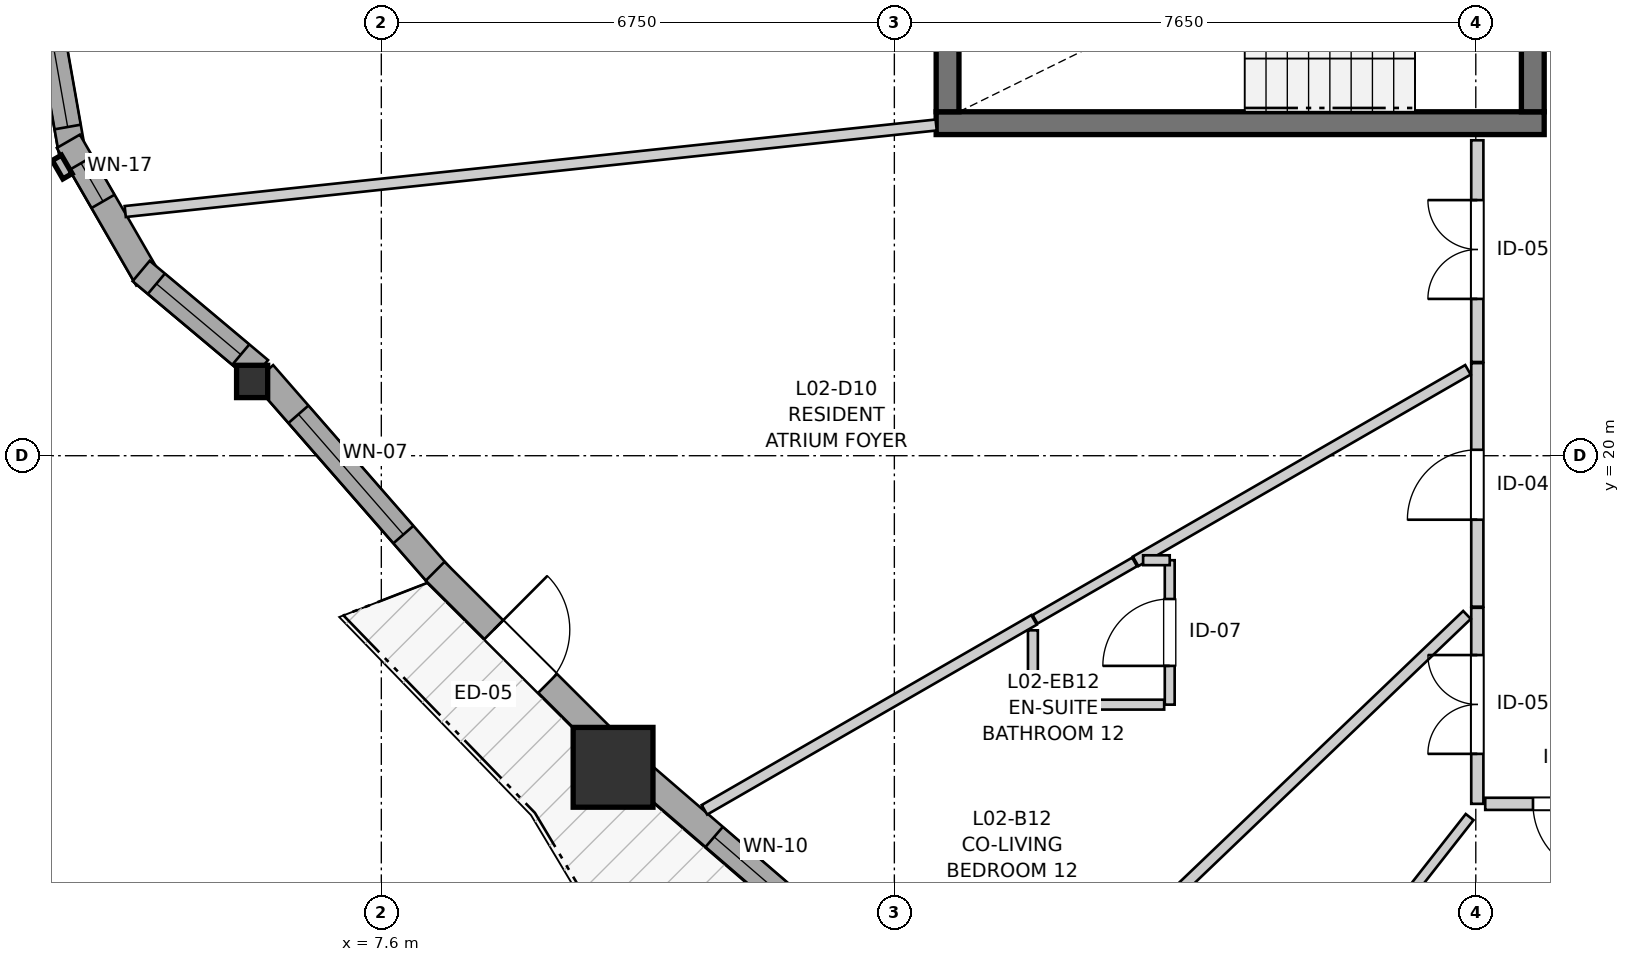
"""IFC4 building model, lengths in metres.
Left out: names, types, materials, properties, quantities, classifications, styles, units other than length and angle.
Written with IfcOpenShell. Run it as: python <this file> out.ifc"""

import sys

from ifc_helpers import new_model, si_unit, direction, frame, frame_2d, origin, origin_2d, place, context, subcontext, project, spatial, rectangle, i_section, extrude, source, transform, mapped, element, fill, save


model = new_model("IFC4")
c1 = context("Model", 3, precision=1e-05, world=origin(), true_north=direction((0.0, 1.0)))
c2 = subcontext(c1, "Body", "Model", "MODEL_VIEW")
j1 = project(units=[si_unit("LENGTHUNIT", "METRE"), si_unit("PLANEANGLEUNIT", "RADIAN")], contexts=[c1])
p1 = place(None, origin())
s1 = spatial("IfcSite", under=j1, at=p1, CompositionType="ELEMENT")
p2 = place(p1, origin())
s2 = spatial("IfcBuilding", under=s1, at=p2, CompositionType="ELEMENT")
p3 = place(p2, frame((0.0, 0.0, 11.0)))
s3 = spatial("IfcBuildingStorey", under=s2, at=p3, CompositionType="ELEMENT", Elevation=11.0)
p4 = place(p3, frame((14.9, 24.375, 0.0), z_axis=(0.0, 0.0, 1.0), x_axis=(1.0, 0.0, 0.0)))
e1 = element("IfcWall", 1, at=p4, inside=s3, PredefinedType="SHEAR", context=c2, shape_type="SweptSolid", body=[
    extrude(rectangle(XDim=8.0, YDim=0.3, at=frame_2d((4.0, 0.0))), origin(), (0.0, 0.0, 1.0), 2.94),
])
p5 = place(p3, frame((15.05, 27.475, 0.0), z_axis=(0.0, 0.0, 1.0), x_axis=(0.0, -1.0, 0.0)))
e2 = element("IfcWall", 2, at=p5, inside=s3, PredefinedType="SHEAR", context=c2, shape_type="SweptSolid", body=[
    extrude(rectangle(XDim=2.95, YDim=0.3, at=frame_2d((1.475, 0.0))), origin(), (0.0, 0.0, 1.0), 2.94),
])
p6 = place(p3, frame((22.75, 24.525, 0.0), z_axis=(0.0, 0.0, 1.0), x_axis=(0.0, 1.0, 0.0)))
e3 = element("IfcWall", 3, at=p6, inside=s3, PredefinedType="SHEAR", context=c2, shape_type="SweptSolid", body=[
    extrude(rectangle(XDim=2.95, YDim=0.3, at=frame_2d((1.475, 0.0))), origin(), (0.0, 0.0, 1.0), 2.94),
])
p7 = place(p6, frame((0.985, 0.0, 0.0)))
e4 = element("IfcOpeningElement", 4, at=p7, cuts=e3, PredefinedType="OPENING", context=c2, shape_type="SweptSolid", body=[
    extrude(rectangle(XDim=0.98, YDim=2.15, at=frame_2d((0.49, 1.075))), frame((0.0, 0.16, 0.0), z_axis=(0.0, -1.0, 0.0), x_axis=(1.0, 0.0, 0.0)), (0.0, 0.0, 1.0), 0.32),
])
m1 = source(origin(), c2, "Body", "SweptSolid", [
    extrude(i_section(OverallWidth=0.409, OverallDepth=0.425, WebThickness=0.03, FlangeThickness=0.048, FilletRadius=0.015, at=origin_2d()), origin(), (0.0, 0.0, 1.0), 2.94),
])
p8 = place(p3, frame((5.9, 20.977, 0.0), z_axis=(0.0, 0.0, 1.0), x_axis=(1.0, 0.0, 0.0)))
e5 = element("IfcColumn", 5, at=p8, inside=s3, PredefinedType="PILASTER", context=c2, shape_type="MappedRepresentation", body=[
    mapped(m1, transform((0.0, 0.0, 0.0), x_axis=(1.0, 0.0, 0.0), y_axis=(0.0, 1.0, 0.0), z_axis=(0.0, 0.0, 1.0), scale=1.0)),
])
m2 = source(origin(), c2, "Body", "SweptSolid", [
    extrude(rectangle(XDim=1.05, YDim=1.05, at=origin_2d()), origin(), (0.0, 0.0, 1.0), 2.94),
])
p9 = place(p3, frame((10.649, 15.9, 0.0), z_axis=(0.0, 0.0, 1.0), x_axis=(1.0, 0.0, 0.0)))
e6 = element("IfcColumn", 6, at=p9, inside=s3, PredefinedType="COLUMN", context=c2, shape_type="MappedRepresentation", body=[
    mapped(m2, transform((0.0, 0.0, 0.0), x_axis=(1.0, 0.0, 0.0), y_axis=(0.0, 1.0, 0.0), z_axis=(0.0, 0.0, 1.0), scale=1.0)),
])
p10 = place(p3, frame((3.166, 26.068, 0.0), z_axis=(0.0, 0.0, 1.0), x_axis=(0.173672066494, -0.984803540469, 0.0)))
e7 = element("IfcWall", 7, at=p10, inside=s3, PredefinedType="SOLIDWALL", context=c2, shape_type="SweptSolid", body=[
    extrude(rectangle(XDim=2.09, YDim=0.35, at=frame_2d((1.045, 0.0))), origin(), (0.0, 0.0, 1.0), 2.42),
])
p11 = place(p10, frame((0.32, 0.0, 0.82)))
e8 = element("IfcOpeningElement", 8, at=p11, cuts=e7, PredefinedType="OPENING", context=c2, shape_type="SweptSolid", body=[
    extrude(rectangle(XDim=1.45, YDim=1.25, at=frame_2d((0.725, 0.625))), frame((0.0, 0.185, 0.0), z_axis=(0.0, -1.0, 0.0), x_axis=(1.0, 0.0, 0.0)), (0.0, 0.0, 1.0), 0.37),
])
p12 = place(p3, frame((3.482, 24.137, 0.0), z_axis=(0.0, 0.0, 1.0), x_axis=(0.499995423472, -0.866028046028, 0.0)))
e9 = element("IfcWall", 9, at=p12, inside=s3, PredefinedType="SOLIDWALL", context=c2, shape_type="SweptSolid", body=[
    extrude(rectangle(XDim=2.09, YDim=0.35, at=frame_2d((1.045, 0.0))), origin(), (0.0, 0.0, 1.0), 2.42),
])
p13 = place(p12, frame((0.333, 0.0, 0.82)))
e10 = element("IfcOpeningElement", 10, at=p13, cuts=e9, PredefinedType="OPENING", context=c2, shape_type="SweptSolid", body=[
    extrude(rectangle(XDim=0.58, YDim=1.35, at=frame_2d((0.29, 0.675))), frame((0.0, 0.185, 0.0), z_axis=(0.0, -1.0, 0.0), x_axis=(1.0, 0.0, 0.0)), (0.0, 0.0, 1.0), 0.37),
])
p14 = place(p3, frame((4.44, 22.43, 0.0), z_axis=(0.0, 0.0, 1.0), x_axis=(0.766090423188, -0.642732808793, 0.0)))
e11 = element("IfcWall", 11, at=p14, inside=s3, PredefinedType="SOLIDWALL", context=c2, shape_type="SweptSolid", body=[
    extrude(rectangle(XDim=2.032, YDim=0.35, at=frame_2d((1.016, 0.0))), origin(), (0.0, 0.0, 1.0), 2.42),
])
p15 = place(p14, frame((0.261, 0.0, 0.82)))
e12 = element("IfcOpeningElement", 12, at=p15, cuts=e11, PredefinedType="OPENING", context=c2, shape_type="SweptSolid", body=[
    extrude(rectangle(XDim=1.45, YDim=1.25, at=frame_2d((0.725, 0.625))), frame((0.0, 0.185, 0.0), z_axis=(0.0, -1.0, 0.0), x_axis=(1.0, 0.0, 0.0)), (0.0, 0.0, 1.0), 0.37),
])
p16 = place(p3, frame((6.045, 21.077, 0.0), z_axis=(0.0, 0.0, 1.0), x_axis=(0.657628390725, -0.753342485004, 0.0)))
e13 = element("IfcWall", 13, at=p16, inside=s3, PredefinedType="SOLIDWALL", context=c2, shape_type="SweptSolid", body=[
    extrude(rectangle(XDim=3.533, YDim=0.35, at=frame_2d((1.766, 0.0))), origin(), (0.0, 0.0, 1.0), 2.42),
])
p17 = place(p16, frame((0.706, 0.0, 0.82)))
e14 = element("IfcOpeningElement", 14, at=p17, cuts=e13, PredefinedType="OPENING", context=c2, shape_type="SweptSolid", body=[
    extrude(rectangle(XDim=2.1, YDim=1.4, at=frame_2d((1.05, 0.7))), frame((0.0, 0.185, 0.0), z_axis=(0.0, -1.0, 0.0), x_axis=(1.0, 0.0, 0.0)), (0.0, 0.0, 1.0), 0.37),
])
p18 = place(p3, frame((8.308, 18.48, 0.0), z_axis=(0.0, 0.0, 1.0), x_axis=(0.708411049028, -0.705800103156, 0.0)))
e15 = element("IfcWall", 15, at=p18, inside=s3, PredefinedType="SOLIDWALL", context=c2, shape_type="SweptSolid", body=[
    extrude(rectangle(XDim=3.179, YDim=0.35, at=frame_2d((1.59, 0.0))), origin(), (0.0, 0.0, 1.0), 2.42),
])
p19 = place(p18, frame((1.09, 0.0, 0.0)))
e16 = element("IfcOpeningElement", 16, at=p19, cuts=e15, PredefinedType="OPENING", context=c2, shape_type="SweptSolid", body=[
    extrude(rectangle(XDim=1.0, YDim=2.1, at=frame_2d((0.5, 1.05))), frame((0.0, 0.185, 0.0), z_axis=(0.0, -1.0, 0.0), x_axis=(1.0, 0.0, 0.0)), (0.0, 0.0, 1.0), 0.37),
])
p20 = place(p3, frame((10.99, 15.837, 0.0), z_axis=(0.0, 0.0, 1.0), x_axis=(0.757465946779, -0.652874673632, 0.0)))
e17 = element("IfcWall", 17, at=p20, inside=s3, PredefinedType="SOLIDWALL", context=c2, shape_type="SweptSolid", body=[
    extrude(rectangle(XDim=3.123, YDim=0.35, at=frame_2d((1.562, 0.0))), origin(), (0.0, 0.0, 1.0), 2.42),
])
p21 = place(p20, frame((1.305, 0.0, 0.82)))
e18 = element("IfcOpeningElement", 18, at=p21, cuts=e17, PredefinedType="OPENING", context=c2, shape_type="SweptSolid", body=[
    extrude(rectangle(XDim=1.4, YDim=1.35, at=frame_2d((0.7, 0.675))), frame((0.0, 0.185, 0.0), z_axis=(0.0, -1.0, 0.0), x_axis=(1.0, 0.0, 0.0)), (0.0, 0.0, 1.0), 0.37),
])
p22 = place(p3, frame((22.02, 18.014, 0.0), z_axis=(0.0, 0.0, 1.0), x_axis=(0.0, 1.0, 0.0)))
e19 = element("IfcWall", 19, at=p22, inside=s3, PredefinedType="PARTITIONING", context=c2, shape_type="SweptSolid", body=[
    extrude(rectangle(XDim=3.204, YDim=0.16, at=frame_2d((1.602, 0.0))), origin(), (0.0, 0.0, 1.0), 2.94),
])
p23 = place(p22, frame((1.144, 0.0, 0.0)))
e20 = element("IfcOpeningElement", 20, at=p23, cuts=e19, PredefinedType="OPENING", context=c2, shape_type="SweptSolid", body=[
    extrude(rectangle(XDim=0.92, YDim=2.1, at=frame_2d((0.46, 1.05))), frame((0.0, 0.09, 0.0), z_axis=(0.0, -1.0, 0.0), x_axis=(1.0, 0.0, 0.0)), (0.0, 0.0, 1.0), 0.18),
])
p24 = place(p3, frame((22.02, 21.233, 0.0), z_axis=(0.0, 0.0, 1.0), x_axis=(0.0, 1.0, 0.0)))
e21 = element("IfcWall", 21, at=p24, inside=s3, PredefinedType="PARTITIONING", context=c2, shape_type="SweptSolid", body=[
    extrude(rectangle(XDim=2.917, YDim=0.16, at=frame_2d((1.458, 0.0))), origin(), (0.0, 0.0, 1.0), 2.94),
])
p25 = place(p24, frame((0.83, 0.0, 0.0)))
e22 = element("IfcOpeningElement", 22, at=p25, cuts=e21, PredefinedType="OPENING", context=c2, shape_type="SweptSolid", body=[
    extrude(rectangle(XDim=1.3, YDim=2.1, at=frame_2d((0.65, 1.05))), frame((0.0, 0.09, 0.0), z_axis=(0.0, -1.0, 0.0), x_axis=(1.0, 0.0, 0.0)), (0.0, 0.0, 1.0), 0.18),
])
p26 = place(p3, frame((22.02, 15.42, 0.0), z_axis=(0.0, 0.0, 1.0), x_axis=(0.0, 1.0, 0.0)))
e23 = element("IfcWall", 23, at=p26, inside=s3, PredefinedType="PARTITIONING", context=c2, shape_type="SweptSolid", body=[
    extrude(rectangle(XDim=2.579, YDim=0.16, at=frame_2d((1.29, 0.0))), origin(), (0.0, 0.0, 1.0), 2.94),
])
p27 = place(p26, frame((0.657, 0.0, 0.0)))
e24 = element("IfcOpeningElement", 24, at=p27, cuts=e23, PredefinedType="OPENING", context=c2, shape_type="SweptSolid", body=[
    extrude(rectangle(XDim=1.3, YDim=2.1, at=frame_2d((0.65, 1.05))), frame((0.0, 0.09, 0.0), z_axis=(0.0, -1.0, 0.0), x_axis=(1.0, 0.0, 0.0)), (0.0, 0.0, 1.0), 0.18),
])
p28 = place(p3, frame((24.368, 15.42, 0.0), z_axis=(0.0, 0.0, 1.0), x_axis=(-1.0, 0.0, 0.0)))
e25 = element("IfcWall", 25, at=p28, inside=s3, PredefinedType="PARTITIONING", context=c2, shape_type="SweptSolid", body=[
    extrude(rectangle(XDim=2.244, YDim=0.16, at=frame_2d((1.122, 0.0))), origin(), (0.0, 0.0, 1.0), 2.94),
])
p29 = place(p28, frame((0.666, 0.0, 0.0)))
e26 = element("IfcOpeningElement", 26, at=p29, cuts=e25, PredefinedType="OPENING", context=c2, shape_type="SweptSolid", body=[
    extrude(rectangle(XDim=0.95, YDim=2.1, at=frame_2d((0.475, 1.05))), frame((0.0, 0.09, 0.0), z_axis=(0.0, -1.0, 0.0), x_axis=(1.0, 0.0, 0.0)), (0.0, 0.0, 1.0), 0.18),
])
p30 = place(p3, frame((17.973, 16.725, 0.0), z_axis=(0.0, 0.0, 1.0), x_axis=(0.0, 1.0, 0.0)))
e27 = element("IfcWall", 27, at=p30, inside=s3, PredefinedType="PARTITIONING", context=c2, shape_type="SweptSolid", body=[
    extrude(rectangle(XDim=1.9, YDim=0.13, at=frame_2d((0.95, 0.0))), origin(), (0.0, 0.0, 1.0), 2.94),
])
p31 = place(p30, frame((0.51, 0.0, 0.0)))
e28 = element("IfcOpeningElement", 28, at=p31, cuts=e27, PredefinedType="OPENING", context=c2, shape_type="SweptSolid", body=[
    extrude(rectangle(XDim=0.88, YDim=2.05, at=frame_2d((0.44, 1.025))), frame((0.0, 0.075, 0.0), z_axis=(0.0, -1.0, 0.0), x_axis=(1.0, 0.0, 0.0)), (0.0, 0.0, 1.0), 0.15),
])
p32 = place(p3, frame((4.231, 23.212, 0.0), z_axis=(0.0, 0.0, 1.0), x_axis=(0.994353055544, 0.106122575023, 0.0)))
e29 = element("IfcWall", 29, at=p32, inside=s3, PredefinedType="PARTITIONING", context=c2, shape_type="SweptSolid", body=[
    extrude(rectangle(XDim=10.73, YDim=0.145, at=frame_2d((5.365, 0.0))), origin(), (0.0, 0.0, 1.0), 2.94),
])
p33 = place(p3, frame((15.888, 12.171, 0.0), z_axis=(0.0, 0.0, 1.0), x_axis=(0.722733244608, 0.691127091886, 0.0)))
e30 = element("IfcWall", 30, at=p33, inside=s3, PredefinedType="PARTITIONING", context=c2, shape_type="SweptSolid", body=[
    extrude(rectangle(XDim=8.296, YDim=0.145, at=frame_2d((4.148, 0.0))), origin(), (0.0, 0.0, 1.0), 2.94),
])
p34 = place(p3, frame((18.296, 10.625, 0.0), z_axis=(0.0, 0.0, 1.0), x_axis=(0.616906721473, 0.787036274261, 0.0)))
e31 = element("IfcWall", 31, at=p34, inside=s3, PredefinedType="PARTITIONING", context=c2, shape_type="SweptSolid", body=[
    extrude(rectangle(XDim=5.872, YDim=0.13, at=frame_2d((2.936, 0.0))), origin(), (0.0, 0.0, 1.0), 2.94),
])
p35 = place(p3, frame((17.524, 18.61, 0.0), z_axis=(0.0, 0.0, 1.0), x_axis=(0.866454437228, 0.499256154903, 0.0)))
e32 = element("IfcWall", 32, at=p35, inside=s3, PredefinedType="PARTITIONING", context=c2, shape_type="SweptSolid", body=[
    extrude(rectangle(XDim=5.047, YDim=0.145, at=frame_2d((2.523, 0.0))), origin(), (0.0, 0.0, 1.0), 2.94),
])
p36 = place(p3, frame((11.851, 15.342, 0.0), z_axis=(0.0, 0.0, 1.0), x_axis=(0.86649075999, 0.499193111784, 0.0)))
e33 = element("IfcWall", 33, at=p36, inside=s3, PredefinedType="PARTITIONING", context=c2, shape_type="SweptSolid", body=[
    extrude(rectangle(XDim=5.005, YDim=0.145, at=frame_2d((2.502, 0.0))), origin(), (0.0, 0.0, 1.0), 2.94),
])
p37 = place(p3, frame((16.173, 16.725, 0.0), z_axis=(0.0, 0.0, 1.0), x_axis=(1.0, 0.0, 0.0)))
e34 = element("IfcWall", 34, at=p37, inside=s3, PredefinedType="PARTITIONING", context=c2, shape_type="SweptSolid", body=[
    extrude(rectangle(XDim=1.727, YDim=0.13, at=frame_2d((0.863, 0.0))), origin(), (0.0, 0.0, 1.0), 2.94),
])
p38 = place(p3, frame((16.201, 17.848, 0.0), z_axis=(0.0, 0.0, 1.0), x_axis=(0.866448907576, 0.49926575144, 0.0)))
e35 = element("IfcWall", 35, at=p38, inside=s3, PredefinedType="PARTITIONING", context=c2, shape_type="SweptSolid", body=[
    extrude(rectangle(XDim=1.512, YDim=0.13, at=frame_2d((0.756, 0.0))), origin(), (0.0, 0.0, 1.0), 2.94),
])
p39 = place(p3, frame((16.173, 16.798, 0.0), z_axis=(0.0, 0.0, 1.0), x_axis=(0.0, 1.0, 0.0)))
e36 = element("IfcWall", 36, at=p39, inside=s3, PredefinedType="PARTITIONING", context=c2, shape_type="SweptSolid", body=[
    extrude(rectangle(XDim=0.905, YDim=0.13, at=frame_2d((0.452, 0.0))), origin(), (0.0, 0.0, 1.0), 2.94),
])
p40 = place(p3, frame((17.623, 18.625, 0.0), z_axis=(0.0, 0.0, 1.0), x_axis=(1.0, 0.0, 0.0)))
e37 = element("IfcWall", 37, at=p40, inside=s3, PredefinedType="PARTITIONING", context=c2, shape_type="SweptSolid", body=[
    extrude(rectangle(XDim=0.35, YDim=0.13, at=frame_2d((0.175, 0.0))), origin(), (0.0, 0.0, 1.0), 2.94),
])
m3 = source(origin(), c2, "Body", "SweptSolid", [
    extrude(rectangle(XDim=1.45, YDim=1.25, at=frame_2d((0.725, 0.625))), frame((0.0, 0.03, 0.0), z_axis=(0.0, -1.0, 0.0), x_axis=(1.0, 0.0, 0.0)), (0.0, 0.0, 1.0), 0.06),
])
p41 = place(p11, origin())
e38 = element("IfcWindow", 38, at=p41, inside=s3, PartitioningType="SINGLE_PANEL", PredefinedType="WINDOW", context=c2, shape_type="MappedRepresentation", body=[
    mapped(m3, transform((0.0, 0.0, 0.0), x_axis=(1.0, 0.0, 0.0), y_axis=(0.0, 1.0, 0.0), z_axis=(0.0, 0.0, 1.0), scale=1.0)),
])
fill(e8, e38)
m4 = source(origin(), c2, "Body", "SweptSolid", [
    extrude(rectangle(XDim=0.58, YDim=1.35, at=frame_2d((0.29, 0.675))), frame((0.0, 0.03, 0.0), z_axis=(0.0, -1.0, 0.0), x_axis=(1.0, 0.0, 0.0)), (0.0, 0.0, 1.0), 0.06),
])
p42 = place(p13, origin())
e39 = element("IfcWindow", 39, at=p42, inside=s3, PartitioningType="SINGLE_PANEL", PredefinedType="WINDOW", context=c2, shape_type="MappedRepresentation", body=[
    mapped(m4, transform((0.0, 0.0, 0.0), x_axis=(1.0, 0.0, 0.0), y_axis=(0.0, 1.0, 0.0), z_axis=(0.0, 0.0, 1.0), scale=1.0)),
])
fill(e10, e39)
p43 = place(p15, origin())
e40 = element("IfcWindow", 40, at=p43, inside=s3, PartitioningType="SINGLE_PANEL", PredefinedType="WINDOW", context=c2, shape_type="MappedRepresentation", body=[
    mapped(m3, transform((0.0, 0.0, 0.0), x_axis=(1.0, 0.0, 0.0), y_axis=(0.0, 1.0, 0.0), z_axis=(0.0, 0.0, 1.0), scale=1.0)),
])
fill(e12, e40)
m5 = source(origin(), c2, "Body", "SweptSolid", [
    extrude(rectangle(XDim=2.1, YDim=1.4, at=frame_2d((1.05, 0.7))), frame((0.0, 0.03, 0.0), z_axis=(0.0, -1.0, 0.0), x_axis=(1.0, 0.0, 0.0)), (0.0, 0.0, 1.0), 0.06),
])
p44 = place(p17, origin())
e41 = element("IfcWindow", 41, at=p44, inside=s3, PartitioningType="SINGLE_PANEL", PredefinedType="WINDOW", context=c2, shape_type="MappedRepresentation", body=[
    mapped(m5, transform((0.0, 0.0, 0.0), x_axis=(1.0, 0.0, 0.0), y_axis=(0.0, 1.0, 0.0), z_axis=(0.0, 0.0, 1.0), scale=1.0)),
])
fill(e14, e41)
m6 = source(origin(), c2, "Body", "SweptSolid", [
    extrude(rectangle(XDim=1.4, YDim=1.35, at=frame_2d((0.7, 0.675))), frame((0.0, 0.03, 0.0), z_axis=(0.0, -1.0, 0.0), x_axis=(1.0, 0.0, 0.0)), (0.0, 0.0, 1.0), 0.06),
])
p45 = place(p21, origin())
e42 = element("IfcWindow", 42, at=p45, inside=s3, PartitioningType="SINGLE_PANEL", PredefinedType="WINDOW", context=c2, shape_type="MappedRepresentation", body=[
    mapped(m6, transform((0.0, 0.0, 0.0), x_axis=(1.0, 0.0, 0.0), y_axis=(0.0, 1.0, 0.0), z_axis=(0.0, 0.0, 1.0), scale=1.0)),
])
fill(e18, e42)
m7 = source(origin(), c2, "Body", "SweptSolid", [
    extrude(rectangle(XDim=1.0, YDim=2.1, at=frame_2d((0.5, 1.05))), frame((0.0, 0.025, 0.0), z_axis=(0.0, -1.0, 0.0), x_axis=(1.0, 0.0, 0.0)), (0.0, 0.0, 1.0), 0.05),
])
p46 = place(p19, origin())
e43 = element("IfcDoor", 43, at=p46, inside=s3, OperationType="SINGLE_SWING_LEFT", PredefinedType="DOOR", context=c2, shape_type="MappedRepresentation", body=[
    mapped(m7, transform((0.0, 0.0, 0.0), x_axis=(1.0, 0.0, 0.0), y_axis=(0.0, 1.0, 0.0), z_axis=(0.0, 0.0, 1.0), scale=1.0)),
])
fill(e16, e43)
m8 = source(origin(), c2, "Body", "SweptSolid", [
    extrude(rectangle(XDim=0.92, YDim=2.1, at=frame_2d((0.46, 1.05))), frame((0.0, 0.025, 0.0), z_axis=(0.0, -1.0, 0.0), x_axis=(1.0, 0.0, 0.0)), (0.0, 0.0, 1.0), 0.05),
])
p47 = place(p23, origin())
e44 = element("IfcDoor", 44, at=p47, inside=s3, OperationType="SINGLE_SWING_LEFT", PredefinedType="DOOR", context=c2, shape_type="MappedRepresentation", body=[
    mapped(m8, transform((0.0, 0.0, 0.0), x_axis=(1.0, 0.0, 0.0), y_axis=(0.0, 1.0, 0.0), z_axis=(0.0, 0.0, 1.0), scale=1.0)),
])
fill(e20, e44)
m9 = source(origin(), c2, "Body", "SweptSolid", [
    extrude(rectangle(XDim=1.3, YDim=2.1, at=frame_2d((0.65, 1.05))), frame((0.0, 0.025, 0.0), z_axis=(0.0, -1.0, 0.0), x_axis=(1.0, 0.0, 0.0)), (0.0, 0.0, 1.0), 0.05),
])
p48 = place(p25, origin())
e45 = element("IfcDoor", 45, at=p48, inside=s3, OperationType="DOUBLE_DOOR_SINGLE_SWING", PredefinedType="DOOR", context=c2, shape_type="MappedRepresentation", body=[
    mapped(m9, transform((0.0, 0.0, 0.0), x_axis=(1.0, 0.0, 0.0), y_axis=(0.0, 1.0, 0.0), z_axis=(0.0, 0.0, 1.0), scale=1.0)),
])
fill(e22, e45)
p49 = place(p27, origin())
e46 = element("IfcDoor", 46, at=p49, inside=s3, OperationType="DOUBLE_DOOR_SINGLE_SWING", PredefinedType="DOOR", context=c2, shape_type="MappedRepresentation", body=[
    mapped(m9, transform((0.0, 0.0, 0.0), x_axis=(1.0, 0.0, 0.0), y_axis=(0.0, 1.0, 0.0), z_axis=(0.0, 0.0, 1.0), scale=1.0)),
])
fill(e24, e46)
m10 = source(origin(), c2, "Body", "SweptSolid", [
    extrude(rectangle(XDim=0.95, YDim=2.1, at=frame_2d((0.475, 1.05))), frame((0.0, 0.025, 0.0), z_axis=(0.0, -1.0, 0.0), x_axis=(1.0, 0.0, 0.0)), (0.0, 0.0, 1.0), 0.05),
])
p50 = place(p29, origin())
e47 = element("IfcDoor", 47, at=p50, inside=s3, OperationType="SINGLE_SWING_LEFT", PredefinedType="DOOR", context=c2, shape_type="MappedRepresentation", body=[
    mapped(m10, transform((0.0, 0.0, 0.0), x_axis=(1.0, 0.0, 0.0), y_axis=(0.0, 1.0, 0.0), z_axis=(0.0, 0.0, 1.0), scale=1.0)),
])
fill(e26, e47)
m11 = source(origin(), c2, "Body", "SweptSolid", [
    extrude(rectangle(XDim=0.88, YDim=2.05, at=frame_2d((0.44, 1.025))), frame((0.0, 0.025, 0.0), z_axis=(0.0, -1.0, 0.0), x_axis=(1.0, 0.0, 0.0)), (0.0, 0.0, 1.0), 0.05),
])
p51 = place(p31, origin())
e48 = element("IfcDoor", 48, at=p51, inside=s3, OperationType="SINGLE_SWING_LEFT", PredefinedType="DOOR", context=c2, shape_type="MappedRepresentation", body=[
    mapped(m11, transform((0.0, 0.0, 0.0), x_axis=(1.0, 0.0, 0.0), y_axis=(0.0, 1.0, 0.0), z_axis=(0.0, 0.0, 1.0), scale=1.0)),
])
fill(e28, e48)
save(model, sys.argv[1])
